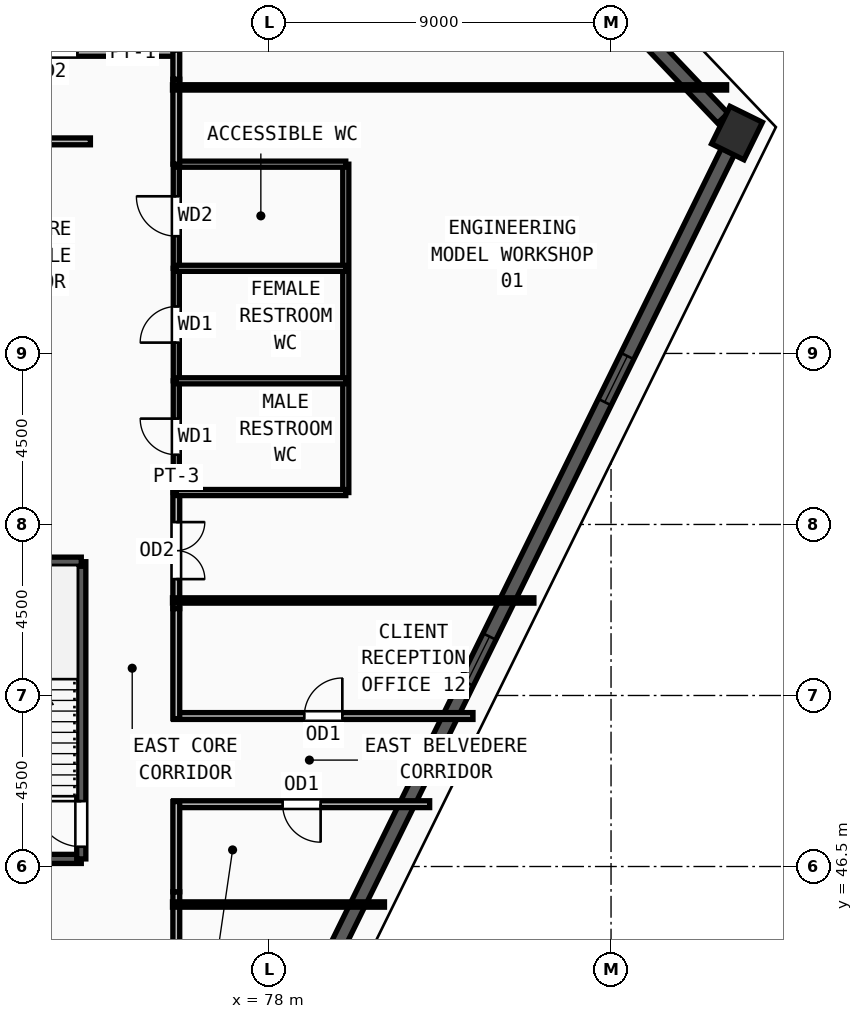
"""IFC4 building model, lengths in metres.
Left out: names, types, materials, properties, quantities, classifications, styles, units other than length and angle.
Written with IfcOpenShell. Run it as: python <this file> out.ifc"""

import sys

from ifc_helpers import new_model, si_unit, direction, frame, frame_2d, origin, origin_2d, place, context, subcontext, project, spatial, rectangle, extrude, source, transform, mapped, element, fill, save


model = new_model("IFC4")
c1 = context("Model", 3, precision=1e-05, world=origin(), true_north=direction((0.0, 1.0)))
c2 = subcontext(c1, "Body", "Model", "MODEL_VIEW")
j1 = project(units=[si_unit("LENGTHUNIT", "METRE"), si_unit("PLANEANGLEUNIT", "RADIAN")], contexts=[c1])
p1 = place(None, origin())
s1 = spatial("IfcSite", under=j1, at=p1, CompositionType="ELEMENT")
p2 = place(p1, origin())
s2 = spatial("IfcBuilding", under=s1, at=p2, CompositionType="ELEMENT")
p3 = place(p2, frame((0.0, 0.0, 297.75)))
s3 = spatial("IfcBuildingStorey", under=s2, at=p3, CompositionType="ELEMENT", Elevation=297.75)
m1 = source(origin(), c2, "Body", "SweptSolid", [
    extrude(rectangle(XDim=1.1, YDim=0.95, at=origin_2d()), origin(), (0.0, 0.0, 1.0), 3.75),
])
p4 = place(p3, frame((90.314, 65.799, 0.0), z_axis=(0.0, 0.0, 1.0), x_axis=(0.441192623644, 0.897412429623, 0.0)))
e1 = element("IfcColumn", 1, at=p4, inside=s3, PredefinedType="COLUMN", context=c2, shape_type="MappedRepresentation", body=[
    mapped(m1, transform((0.0, 0.0, 0.0), x_axis=(1.0, 0.0, 0.0), y_axis=(0.0, 1.0, 0.0), z_axis=(0.0, 0.0, 1.0), scale=1.0)),
])
p5 = place(p3, frame((78.3, 41.359, 0.0), z_axis=(0.0, 0.0, 1.0), x_axis=(0.441159552697, 0.897428687453, 0.0)))
e2 = element("IfcWall", 2, at=p5, inside=s3, PredefinedType="SOLIDWALL", context=c2, shape_type="SweptSolid", body=[
    extrude(rectangle(XDim=26.693, YDim=0.38, at=frame_2d((13.347, 0.0))), origin(), (0.0, 0.0, 1.0), 3.57),
])
m2 = source(origin(), c2, "Body", "SweptSolid", [
    extrude(rectangle(XDim=1.35, YDim=1.85, at=frame_2d((0.675, 0.925))), frame((0.0, 0.2, 0.0), z_axis=(0.0, -1.0, 0.0), x_axis=(1.0, 0.0, 0.0)), (0.0, 0.0, 1.0), 0.4),
])
p6 = place(p5, frame((11.121, 0.0, 0.55)))
e3 = element("IfcOpeningElement", 3, at=p6, cuts=e2, PredefinedType="OPENING", context=c2, shape_type="MappedRepresentation", body=[
    mapped(m2, transform((0.0, 0.0, 0.0), x_axis=(1.0, 0.0, 0.0), y_axis=(0.0, 1.0, 0.0), z_axis=(0.0, 0.0, 1.0), scale=1.0)),
])
p7 = place(p5, frame((19.345, 0.0, 0.55)))
e4 = element("IfcOpeningElement", 4, at=p7, cuts=e2, PredefinedType="OPENING", context=c2, shape_type="MappedRepresentation", body=[
    mapped(m2, transform((0.0, 0.0, 0.0), x_axis=(1.0, 0.0, 0.0), y_axis=(0.0, 1.0, 0.0), z_axis=(0.0, 0.0, 1.0), scale=1.0)),
])
p8 = place(p3, frame((89.942, 66.19, 0.0), z_axis=(0.0, 0.0, 1.0), x_axis=(-0.689222359841, 0.724549886961, 0.0)))
e5 = element("IfcWall", 5, at=p8, inside=s3, PredefinedType="SOLIDWALL", context=c2, shape_type="SweptSolid", body=[
    extrude(rectangle(XDim=4.001, YDim=0.38, at=frame_2d((2.0, 0.0))), origin(), (0.0, 0.0, 1.0), 3.57),
])
p9 = place(p3, frame((69.62, 46.7, 0.0), z_axis=(0.0, 0.0, 1.0), x_axis=(1.0, 0.0, 0.0)))
e6 = element("IfcWall", 6, at=p9, inside=s3, PredefinedType="SOLIDWALL", context=c2, shape_type="SweptSolid", body=[
    extrude(rectangle(XDim=3.44, YDim=0.24, at=frame_2d((1.72, 0.0))), origin(), (0.0, 0.0, 1.0), 3.57),
])
p10 = place(p3, frame((73.06, 46.7, 0.0), z_axis=(0.0, 0.0, 1.0), x_axis=(0.0, 1.0, 0.0)))
e7 = element("IfcWall", 7, at=p10, inside=s3, PredefinedType="SOLIDWALL", context=c2, shape_type="SweptSolid", body=[
    extrude(rectangle(XDim=7.82, YDim=0.24, at=frame_2d((3.91, 0.0))), origin(), (0.0, 0.0, 1.0), 3.57),
])
m3 = source(origin(), c2, "Body", "SweptSolid", [
    extrude(rectangle(XDim=1.2, YDim=2.2, at=frame_2d((0.6, 1.1))), frame((0.0, 0.13, 0.0), z_axis=(0.0, -1.0, 0.0), x_axis=(1.0, 0.0, 0.0)), (0.0, 0.0, 1.0), 0.26),
])
p11 = place(p10, frame((0.32, 0.0, 0.0)))
e8 = element("IfcOpeningElement", 8, at=p11, cuts=e7, PredefinedType="OPENING", context=c2, shape_type="MappedRepresentation", body=[
    mapped(m3, transform((0.0, 0.0, 0.0), x_axis=(1.0, 0.0, 0.0), y_axis=(0.0, 1.0, 0.0), z_axis=(0.0, 0.0, 1.0), scale=1.0)),
])
p12 = place(p3, frame((73.06, 54.52, 0.0), z_axis=(0.0, 0.0, 1.0), x_axis=(-1.0, 0.0, 0.0)))
e9 = element("IfcWall", 9, at=p12, inside=s3, PredefinedType="SOLIDWALL", context=c2, shape_type="SweptSolid", body=[
    extrude(rectangle(XDim=3.44, YDim=0.24, at=frame_2d((1.72, 0.0))), origin(), (0.0, 0.0, 1.0), 3.57),
])
p13 = place(p3, frame((75.56, 56.34, 0.0), z_axis=(0.0, 0.0, 1.0), x_axis=(0.0, 1.0, 0.0)))
e10 = element("IfcWall", 10, at=p13, inside=s3, PredefinedType="PARTITIONING", context=c2, shape_type="SweptSolid", body=[
    extrude(rectangle(XDim=2.94, YDim=0.16, at=frame_2d((1.47, 0.0))), origin(), (0.0, 0.0, 1.0), 3.57),
])
m4 = source(origin(), c2, "Body", "SweptSolid", [
    extrude(rectangle(XDim=0.95, YDim=2.15, at=frame_2d((0.475, 1.075))), frame((0.0, 0.09, 0.0), z_axis=(0.0, -1.0, 0.0), x_axis=(1.0, 0.0, 0.0)), (0.0, 0.0, 1.0), 0.18),
])
p14 = place(p13, frame((0.995, 0.0, 0.0)))
e11 = element("IfcOpeningElement", 11, at=p14, cuts=e10, PredefinedType="OPENING", context=c2, shape_type="MappedRepresentation", body=[
    mapped(m4, transform((0.0, 0.0, 0.0), x_axis=(1.0, 0.0, 0.0), y_axis=(0.0, 1.0, 0.0), z_axis=(0.0, 0.0, 1.0), scale=1.0)),
])
p15 = place(p3, frame((75.56, 59.28, 0.0), z_axis=(0.0, 0.0, 1.0), x_axis=(0.0, 1.0, 0.0)))
e12 = element("IfcWall", 12, at=p15, inside=s3, PredefinedType="PARTITIONING", context=c2, shape_type="SweptSolid", body=[
    extrude(rectangle(XDim=2.96, YDim=0.16, at=frame_2d((1.48, 0.0))), origin(), (0.0, 0.0, 1.0), 3.57),
])
p16 = place(p15, frame((1.005, 0.0, 0.0)))
e13 = element("IfcOpeningElement", 13, at=p16, cuts=e12, PredefinedType="OPENING", context=c2, shape_type="MappedRepresentation", body=[
    mapped(m4, transform((0.0, 0.0, 0.0), x_axis=(1.0, 0.0, 0.0), y_axis=(0.0, 1.0, 0.0), z_axis=(0.0, 0.0, 1.0), scale=1.0)),
])
p17 = place(p3, frame((75.56, 62.24, 0.0), z_axis=(0.0, 0.0, 1.0), x_axis=(0.0, 1.0, 0.0)))
e14 = element("IfcWall", 14, at=p17, inside=s3, PredefinedType="PARTITIONING", context=c2, shape_type="SweptSolid", body=[
    extrude(rectangle(XDim=2.74, YDim=0.16, at=frame_2d((1.37, 0.0))), origin(), (0.0, 0.0, 1.0), 3.57),
])
m5 = source(origin(), c2, "Body", "SweptSolid", [
    extrude(rectangle(XDim=1.05, YDim=2.15, at=frame_2d((0.525, 1.075))), frame((0.0, 0.09, 0.0), z_axis=(0.0, -1.0, 0.0), x_axis=(1.0, 0.0, 0.0)), (0.0, 0.0, 1.0), 0.18),
])
p18 = place(p17, frame((0.845, 0.0, 0.0)))
e15 = element("IfcOpeningElement", 15, at=p18, cuts=e14, PredefinedType="OPENING", context=c2, shape_type="MappedRepresentation", body=[
    mapped(m5, transform((0.0, 0.0, 0.0), x_axis=(1.0, 0.0, 0.0), y_axis=(0.0, 1.0, 0.0), z_axis=(0.0, 0.0, 1.0), scale=1.0)),
])
p19 = place(p3, frame((69.46, 65.58, 0.0), z_axis=(0.0, 0.0, 1.0), x_axis=(1.0, 0.0, 0.0)))
e16 = element("IfcWall", 16, at=p19, inside=s3, PredefinedType="PARTITIONING", context=c2, shape_type="SweptSolid", body=[
    extrude(rectangle(XDim=3.84, YDim=0.18, at=frame_2d((1.92, 0.0))), origin(), (0.0, 0.0, 1.0), 3.57),
])
m6 = source(origin(), c2, "Body", "SweptSolid", [
    extrude(rectangle(XDim=1.3, YDim=2.2, at=frame_2d((0.65, 1.1))), frame((0.0, 0.1, 0.0), z_axis=(0.0, -1.0, 0.0), x_axis=(1.0, 0.0, 0.0)), (0.0, 0.0, 1.0), 0.2),
])
p20 = place(p19, frame((1.27, 0.0, 0.0)))
e17 = element("IfcOpeningElement", 17, at=p20, cuts=e16, PredefinedType="OPENING", context=c2, shape_type="MappedRepresentation", body=[
    mapped(m6, transform((0.0, 0.0, 0.0), x_axis=(1.0, 0.0, 0.0), y_axis=(0.0, 1.0, 0.0), z_axis=(0.0, 0.0, 1.0), scale=1.0)),
])
p21 = place(p3, frame((75.56, 56.34, 0.0), z_axis=(0.0, 0.0, 1.0), x_axis=(0.0, -1.0, 0.0)))
e18 = element("IfcWall", 18, at=p21, inside=s3, PredefinedType="PARTITIONING", context=c2, shape_type="SweptSolid", body=[
    extrude(rectangle(XDim=3.055, YDim=0.18, at=frame_2d((1.528, 0.0))), origin(), (0.0, 0.0, 1.0), 3.57),
])
m7 = source(origin(), c2, "Body", "SweptSolid", [
    extrude(rectangle(XDim=1.5, YDim=2.2, at=frame_2d((0.75, 1.1))), frame((0.0, 0.1, 0.0), z_axis=(0.0, -1.0, 0.0), x_axis=(1.0, 0.0, 0.0)), (0.0, 0.0, 1.0), 0.2),
])
p22 = place(p21, frame((0.778, 0.0, 0.0)))
e19 = element("IfcOpeningElement", 19, at=p22, cuts=e18, PredefinedType="OPENING", context=c2, shape_type="MappedRepresentation", body=[
    mapped(m7, transform((0.0, 0.0, 0.0), x_axis=(1.0, 0.0, 0.0), y_axis=(0.0, 1.0, 0.0), z_axis=(0.0, 0.0, 1.0), scale=1.0)),
])
p23 = place(p3, frame((68.785, 67.91, 0.0), z_axis=(0.0, 0.0, 1.0), x_axis=(1.0, 0.0, 0.0)))
e20 = element("IfcWall", 20, at=p23, inside=s3, PredefinedType="PARTITIONING", context=c2, shape_type="SweptSolid", body=[
    extrude(rectangle(XDim=6.845, YDim=0.18, at=frame_2d((3.422, 0.0))), origin(), (0.0, 0.0, 1.0), 3.57),
])
p24 = place(p23, frame((2.672, 0.0, 0.0)))
e21 = element("IfcOpeningElement", 21, at=p24, cuts=e20, PredefinedType="OPENING", context=c2, shape_type="MappedRepresentation", body=[
    mapped(m7, transform((0.0, 0.0, 0.0), x_axis=(1.0, 0.0, 0.0), y_axis=(0.0, 1.0, 0.0), z_axis=(0.0, 0.0, 1.0), scale=1.0)),
])
p25 = place(p3, frame((82.227, 48.14, 0.0), z_axis=(0.0, 0.0, 1.0), x_axis=(-1.0, 0.0, 0.0)))
e22 = element("IfcWall", 22, at=p25, inside=s3, PredefinedType="PARTITIONING", context=c2, shape_type="SweptSolid", body=[
    extrude(rectangle(XDim=6.737, YDim=0.18, at=frame_2d((3.369, 0.0))), origin(), (0.0, 0.0, 1.0), 3.57),
])
m8 = source(origin(), c2, "Body", "SweptSolid", [
    extrude(rectangle(XDim=1.0, YDim=2.2, at=frame_2d((0.5, 1.1))), frame((0.0, 0.1, 0.0), z_axis=(0.0, -1.0, 0.0), x_axis=(1.0, 0.0, 0.0)), (0.0, 0.0, 1.0), 0.2),
])
p26 = place(p25, frame((2.869, 0.0, 0.0)))
e23 = element("IfcOpeningElement", 23, at=p26, cuts=e22, PredefinedType="OPENING", context=c2, shape_type="MappedRepresentation", body=[
    mapped(m8, transform((0.0, 0.0, 0.0), x_axis=(1.0, 0.0, 0.0), y_axis=(0.0, 1.0, 0.0), z_axis=(0.0, 0.0, 1.0), scale=1.0)),
])
p27 = place(p3, frame((75.49, 50.46, 0.0), z_axis=(0.0, 0.0, 1.0), x_axis=(1.0, 0.0, 0.0)))
e24 = element("IfcWall", 24, at=p27, inside=s3, PredefinedType="PARTITIONING", context=c2, shape_type="SweptSolid", body=[
    extrude(rectangle(XDim=7.877, YDim=0.18, at=frame_2d((3.938, 0.0))), origin(), (0.0, 0.0, 1.0), 3.57),
])
p28 = place(p27, frame((3.439, 0.0, 0.0)))
e25 = element("IfcOpeningElement", 25, at=p28, cuts=e24, PredefinedType="OPENING", context=c2, shape_type="MappedRepresentation", body=[
    mapped(m8, transform((0.0, 0.0, 0.0), x_axis=(1.0, 0.0, 0.0), y_axis=(0.0, 1.0, 0.0), z_axis=(0.0, 0.0, 1.0), scale=1.0)),
])
p29 = place(p3, frame((80.02, 56.34, 0.0), z_axis=(0.0, 0.0, 1.0), x_axis=(0.0, 1.0, 0.0)))
e26 = element("IfcWall", 26, at=p29, inside=s3, PredefinedType="PARTITIONING", context=c2, shape_type="SweptSolid", body=[
    extrude(rectangle(XDim=8.64, YDim=0.16, at=frame_2d((4.32, 0.0))), origin(), (0.0, 0.0, 1.0), 3.57),
])
for number, where, z_axis, x_axis in (
    (27, (75.56, 56.34, 0.0), (0.0, 0.0, 1.0), (1.0, 0.0, 0.0)),
    (28, (75.56, 59.28, 0.0), (0.0, 0.0, 1.0), (1.0, 0.0, 0.0)),
    (29, (75.56, 62.24, 0.0), (0.0, 0.0, 1.0), (1.0, 0.0, 0.0)),
    (30, (75.56, 64.98, 0.0), (0.0, 0.0, 1.0), (1.0, 0.0, 0.0)),
):
    element("IfcWall", number, at=place(p3, frame(where, z_axis=z_axis, x_axis=x_axis)), inside=s3, PredefinedType="PARTITIONING", context=c2, shape_type="SweptSolid", body=[
        extrude(rectangle(XDim=4.46, YDim=0.16, at=frame_2d((2.23, 0.0))), origin(), (0.0, 0.0, 1.0), 3.57),
    ])
p30 = place(p3, frame((75.56, 67.215, 0.0), z_axis=(0.0, 0.0, 1.0), x_axis=(0.0, -1.0, 0.0)))
e31 = element("IfcWall", 31, at=p30, inside=s3, PredefinedType="PARTITIONING", context=c2, shape_type="SweptSolid", body=[
    extrude(rectangle(XDim=2.235, YDim=0.18, at=frame_2d((1.118, 0.0))), origin(), (0.0, 0.0, 1.0), 3.57),
])
p31 = place(p3, frame((75.56, 67.98, 0.0), z_axis=(0.0, 0.0, 1.0), x_axis=(0.0, -1.0, 0.0)))
e32 = element("IfcWall", 32, at=p31, inside=s3, PredefinedType="PARTITIONING", context=c2, shape_type="SweptSolid", body=[
    extrude(rectangle(XDim=0.765, YDim=0.18, at=frame_2d((0.382, 0.0))), origin(), (0.0, 0.0, 1.0), 3.57),
])
p32 = place(p3, frame((75.56, 45.835, 0.0), z_axis=(0.0, 0.0, 1.0), x_axis=(0.0, -1.0, 0.0)))
e33 = element("IfcWall", 33, at=p32, inside=s3, PredefinedType="PARTITIONING", context=c2, shape_type="SweptSolid", body=[
    extrude(rectangle(XDim=2.165, YDim=0.18, at=frame_2d((1.083, 0.0))), origin(), (0.0, 0.0, 1.0), 3.57),
])
p33 = place(p3, frame((75.56, 48.21, 0.0), z_axis=(0.0, 0.0, 1.0), x_axis=(0.0, -1.0, 0.0)))
e34 = element("IfcWall", 34, at=p33, inside=s3, PredefinedType="PARTITIONING", context=c2, shape_type="SweptSolid", body=[
    extrude(rectangle(XDim=2.375, YDim=0.18, at=frame_2d((1.188, 0.0))), origin(), (0.0, 0.0, 1.0), 3.57),
])
p34 = place(p3, frame((75.56, 53.285, 0.0), z_axis=(0.0, 0.0, 1.0), x_axis=(0.0, -1.0, 0.0)))
e35 = element("IfcWall", 35, at=p34, inside=s3, PredefinedType="PARTITIONING", context=c2, shape_type="SweptSolid", body=[
    extrude(rectangle(XDim=2.895, YDim=0.18, at=frame_2d((1.448, 0.0))), origin(), (0.0, 0.0, 1.0), 3.57),
])
p35 = place(p3, frame((75.46, 45.5, 0.0), z_axis=(0.0, 0.0, 1.0), x_axis=(1.0, 0.0, 0.0)))
e36 = element("IfcWall", 36, at=p35, inside=s3, PredefinedType="PARTITIONING", context=c2, shape_type="SweptSolid", body=[
    extrude(rectangle(XDim=5.578, YDim=0.14, at=frame_2d((2.789, 0.0))), origin(), (0.0, 0.0, 1.0), 3.57),
])
p36 = place(p3, frame((75.46, 53.5, 0.0), z_axis=(0.0, 0.0, 1.0), x_axis=(1.0, 0.0, 0.0)))
e37 = element("IfcWall", 37, at=p36, inside=s3, PredefinedType="PARTITIONING", context=c2, shape_type="SweptSolid", body=[
    extrude(rectangle(XDim=9.51, YDim=0.14, at=frame_2d((4.755, 0.0))), origin(), (0.0, 0.0, 1.0), 3.57),
])
p37 = place(p3, frame((75.46, 67.0, 0.0), z_axis=(0.0, 0.0, 1.0), x_axis=(1.0, 0.0, 0.0)))
e38 = element("IfcWall", 38, at=p37, inside=s3, PredefinedType="PARTITIONING", context=c2, shape_type="SweptSolid", body=[
    extrude(rectangle(XDim=14.581, YDim=0.14, at=frame_2d((7.291, 0.0))), origin(), (0.0, 0.0, 1.0), 3.57),
])
m9 = source(origin(), c2, "Body", "SweptSolid", [
    extrude(rectangle(XDim=1.35, YDim=1.85, at=frame_2d((0.675, 0.925))), frame((0.0, 0.03, 0.0), z_axis=(0.0, -1.0, 0.0), x_axis=(1.0, 0.0, 0.0)), (0.0, 0.0, 1.0), 0.06),
])
p38 = place(p6, origin())
e39 = element("IfcWindow", 39, at=p38, inside=s3, PartitioningType="SINGLE_PANEL", PredefinedType="WINDOW", context=c2, shape_type="MappedRepresentation", body=[
    mapped(m9, transform((0.0, 0.0, 0.0), x_axis=(1.0, 0.0, 0.0), y_axis=(0.0, 1.0, 0.0), z_axis=(0.0, 0.0, 1.0), scale=1.0)),
])
fill(e3, e39)
p39 = place(p7, origin())
e40 = element("IfcWindow", 40, at=p39, inside=s3, PartitioningType="SINGLE_PANEL", PredefinedType="WINDOW", context=c2, shape_type="MappedRepresentation", body=[
    mapped(m9, transform((0.0, 0.0, 0.0), x_axis=(1.0, 0.0, 0.0), y_axis=(0.0, 1.0, 0.0), z_axis=(0.0, 0.0, 1.0), scale=1.0)),
])
fill(e4, e40)
m10 = source(origin(), c2, "Body", "SweptSolid", [
    extrude(rectangle(XDim=1.2, YDim=2.2, at=frame_2d((0.6, 1.1))), frame((0.0, 0.025, 0.0), z_axis=(0.0, -1.0, 0.0), x_axis=(1.0, 0.0, 0.0)), (0.0, 0.0, 1.0), 0.05),
])
p40 = place(p11, origin())
e41 = element("IfcDoor", 41, at=p40, inside=s3, OperationType="SINGLE_SWING_RIGHT", PredefinedType="DOOR", context=c2, shape_type="MappedRepresentation", body=[
    mapped(m10, transform((0.0, 0.0, 0.0), x_axis=(1.0, 0.0, 0.0), y_axis=(0.0, 1.0, 0.0), z_axis=(0.0, 0.0, 1.0), scale=1.0)),
])
fill(e8, e41)
m11 = source(origin(), c2, "Body", "SweptSolid", [
    extrude(rectangle(XDim=0.95, YDim=2.15, at=frame_2d((0.475, 1.075))), frame((0.0, 0.025, 0.0), z_axis=(0.0, -1.0, 0.0), x_axis=(1.0, 0.0, 0.0)), (0.0, 0.0, 1.0), 0.05),
])
p41 = place(p14, origin())
e42 = element("IfcDoor", 42, at=p41, inside=s3, OperationType="SINGLE_SWING_RIGHT", PredefinedType="DOOR", context=c2, shape_type="MappedRepresentation", body=[
    mapped(m11, transform((0.0, 0.0, 0.0), x_axis=(1.0, 0.0, 0.0), y_axis=(0.0, 1.0, 0.0), z_axis=(0.0, 0.0, 1.0), scale=1.0)),
])
fill(e11, e42)
p42 = place(p16, origin())
e43 = element("IfcDoor", 43, at=p42, inside=s3, OperationType="SINGLE_SWING_LEFT", PredefinedType="DOOR", context=c2, shape_type="MappedRepresentation", body=[
    mapped(m11, transform((0.0, 0.0, 0.0), x_axis=(1.0, 0.0, 0.0), y_axis=(0.0, 1.0, 0.0), z_axis=(0.0, 0.0, 1.0), scale=1.0)),
])
fill(e13, e43)
m12 = source(origin(), c2, "Body", "SweptSolid", [
    extrude(rectangle(XDim=1.05, YDim=2.15, at=frame_2d((0.525, 1.075))), frame((0.0, 0.025, 0.0), z_axis=(0.0, -1.0, 0.0), x_axis=(1.0, 0.0, 0.0)), (0.0, 0.0, 1.0), 0.05),
])
p43 = place(p18, origin())
e44 = element("IfcDoor", 44, at=p43, inside=s3, OperationType="SINGLE_SWING_RIGHT", PredefinedType="DOOR", context=c2, shape_type="MappedRepresentation", body=[
    mapped(m12, transform((0.0, 0.0, 0.0), x_axis=(1.0, 0.0, 0.0), y_axis=(0.0, 1.0, 0.0), z_axis=(0.0, 0.0, 1.0), scale=1.0)),
])
fill(e15, e44)
m13 = source(origin(), c2, "Body", "SweptSolid", [
    extrude(rectangle(XDim=1.5, YDim=2.2, at=frame_2d((0.75, 1.1))), frame((0.0, 0.025, 0.0), z_axis=(0.0, -1.0, 0.0), x_axis=(1.0, 0.0, 0.0)), (0.0, 0.0, 1.0), 0.05),
])
p44 = place(p22, origin())
e45 = element("IfcDoor", 45, at=p44, inside=s3, OperationType="DOUBLE_DOOR_SINGLE_SWING", PredefinedType="DOOR", context=c2, shape_type="MappedRepresentation", body=[
    mapped(m13, transform((0.0, 0.0, 0.0), x_axis=(1.0, 0.0, 0.0), y_axis=(0.0, 1.0, 0.0), z_axis=(0.0, 0.0, 1.0), scale=1.0)),
])
fill(e19, e45)
p45 = place(p24, origin())
e46 = element("IfcDoor", 46, at=p45, inside=s3, OperationType="DOUBLE_DOOR_SINGLE_SWING", PredefinedType="DOOR", context=c2, shape_type="MappedRepresentation", body=[
    mapped(m13, transform((0.0, 0.0, 0.0), x_axis=(1.0, 0.0, 0.0), y_axis=(0.0, 1.0, 0.0), z_axis=(0.0, 0.0, 1.0), scale=1.0)),
])
fill(e21, e46)
m14 = source(origin(), c2, "Body", "SweptSolid", [
    extrude(rectangle(XDim=1.0, YDim=2.2, at=frame_2d((0.5, 1.1))), frame((0.0, 0.025, 0.0), z_axis=(0.0, -1.0, 0.0), x_axis=(1.0, 0.0, 0.0)), (0.0, 0.0, 1.0), 0.05),
])
p46 = place(p26, origin())
e47 = element("IfcDoor", 47, at=p46, inside=s3, OperationType="SINGLE_SWING_LEFT", PredefinedType="DOOR", context=c2, shape_type="MappedRepresentation", body=[
    mapped(m14, transform((0.0, 0.0, 0.0), x_axis=(1.0, 0.0, 0.0), y_axis=(0.0, 1.0, 0.0), z_axis=(0.0, 0.0, 1.0), scale=1.0)),
])
fill(e23, e47)
p47 = place(p28, origin())
e48 = element("IfcDoor", 48, at=p47, inside=s3, OperationType="SINGLE_SWING_RIGHT", PredefinedType="DOOR", context=c2, shape_type="MappedRepresentation", body=[
    mapped(m14, transform((0.0, 0.0, 0.0), x_axis=(1.0, 0.0, 0.0), y_axis=(0.0, 1.0, 0.0), z_axis=(0.0, 0.0, 1.0), scale=1.0)),
])
fill(e25, e48)
save(model, sys.argv[1])
